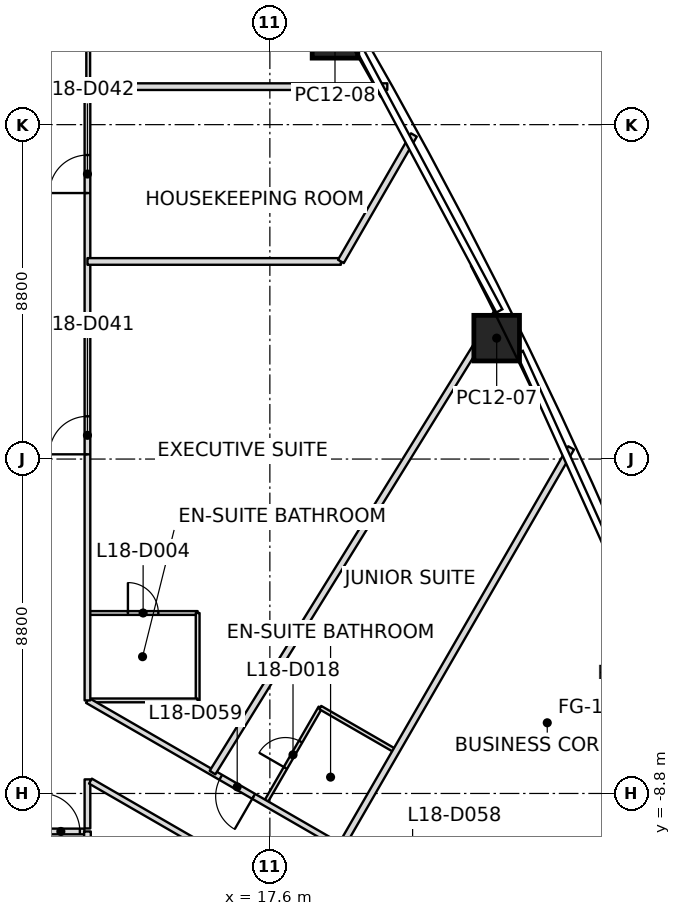
"""IFC4 building model, lengths in metres.
Left out: names, types, materials, properties, quantities, classifications, styles, units other than length and angle.
Written with IfcOpenShell. Run it as: python <this file> out.ifc"""

import sys

from ifc_helpers import new_model, si_unit, direction, frame, frame_2d, origin, origin_2d, place, context, subcontext, project, spatial, rectangle, extrude, element, fill, save


model = new_model("IFC4")
c1 = context("Model", 3, precision=1e-05, world=origin(), true_north=direction((0.0, 1.0)))
c2 = subcontext(c1, "Body", "Model", "MODEL_VIEW")
j1 = project(units=[si_unit("LENGTHUNIT", "METRE"), si_unit("PLANEANGLEUNIT", "RADIAN")], contexts=[c1])
p1 = place(None, origin())
s1 = spatial("IfcSite", under=j1, at=p1, CompositionType="ELEMENT")
p2 = place(p1, origin())
s2 = spatial("IfcBuilding", under=s1, at=p2, CompositionType="ELEMENT")
p3 = place(p2, frame((0.0, 0.0, 88.7)))
s3 = spatial("IfcBuildingStorey", under=s2, at=p3, CompositionType="ELEMENT", Elevation=88.7)
p4 = place(p3, frame((23.568, 3.182, 0.0), z_axis=(-0.015240683228, 0.002309194428, 0.99988118754), x_axis=(-0.441368451021, 0.897282817129, -0.008799802757)))
e1 = element("IfcColumn", 1, at=p4, inside=s3, PredefinedType="COLUMN", context=c2, shape_type="SweptSolid", body=[
    extrude(rectangle(XDim=1.2, YDim=1.2, at=origin_2d()), origin(), (0.0, 0.0, 1.0), 3.7),
])
p5 = place(p3, frame((19.314, 11.151, 0.0), z_axis=(-0.010754701703, -0.006136118149, 0.999923339284), x_axis=(-0.499971083262, 0.866042095943, -6.290806e-05)))
e2 = element("IfcColumn", 2, at=p5, inside=s3, PredefinedType="COLUMN", context=c2, shape_type="SweptSolid", body=[
    extrude(rectangle(XDim=1.2, YDim=1.2, at=origin_2d()), origin(), (0.0, 0.0, 1.0), 3.7),
])
p6 = place(p3, frame((12.8, -9.8, 0.0), z_axis=(0.0, 0.0, 1.0), x_axis=(0.0, -1.0, 0.0)))
e3 = element("IfcWall", 3, at=p6, inside=s3, PredefinedType="PARTITIONING", context=c2, shape_type="SweptSolid", body=[
    extrude(rectangle(XDim=6.271, YDim=0.175, at=frame_2d((3.135, 0.0))), origin(), (0.0, 0.0, 1.0), 3.15),
])
p7 = place(p3, frame((12.8, 5.2, 0.0), z_axis=(0.0, 0.0, 1.0), x_axis=(1.0, 0.0, 0.0)))
e4 = element("IfcWall", 4, at=p7, inside=s3, PredefinedType="PARTITIONING", context=c2, shape_type="SweptSolid", body=[
    extrude(rectangle(XDim=6.669, YDim=0.175, at=frame_2d((3.334, 0.0))), origin(), (0.0, 0.0, 1.0), 3.017),
])
p8 = place(p3, frame((19.469, 5.2, 0.0), z_axis=(0.0, 0.0, 1.0), x_axis=(0.50000659858, 0.866021594059, 0.0)))
e5 = element("IfcWall", 5, at=p8, inside=s3, PredefinedType="PARTITIONING", context=c2, shape_type="SweptSolid", body=[
    extrude(rectangle(XDim=3.843, YDim=0.175, at=frame_2d((1.921, 0.0))), origin(), (0.0, 0.0, 1.0), 2.934),
])
p9 = place(p3, frame((20.69, 9.8, 0.0), z_axis=(0.0, 0.0, 1.0), x_axis=(-1.0, 0.0, 0.0)))
e6 = element("IfcWall", 6, at=p9, inside=s3, PredefinedType="PARTITIONING", context=c2, shape_type="SweptSolid", body=[
    extrude(rectangle(XDim=7.81, YDim=0.175, at=frame_2d((3.905, 0.0))), origin(), (0.0, 0.0, 1.0), 2.934),
])
p10 = place(p3, frame((23.572, 3.843, 0.0), z_axis=(0.0, 0.0, 1.0), x_axis=(-0.526072077188, -0.850439985891, 0.0)))
e7 = element("IfcWall", 7, at=p10, inside=s3, PredefinedType="PARTITIONING", context=c2, shape_type="SweptSolid", body=[
    extrude(rectangle(XDim=14.221, YDim=0.175, at=frame_2d((7.11, 0.0))), origin(), (0.0, 0.0, 1.0), 2.947),
])
p11 = place(p3, frame((25.527, 0.293, 0.0), z_axis=(0.0, 0.0, 1.0), x_axis=(-0.499987549055, -0.866032592222, 0.0)))
e8 = element("IfcWall", 8, at=p11, inside=s3, PredefinedType="PARTITIONING", context=c2, shape_type="SweptSolid", body=[
    extrude(rectangle(XDim=12.117, YDim=0.175, at=frame_2d((6.059, 0.0))), origin(), (0.0, 0.0, 1.0), 2.934),
])
p12 = place(p3, frame((12.72, 9.8, 0.0), z_axis=(0.0, 0.0, 1.0), x_axis=(-1.0, 0.0, 0.0)))
e9 = element("IfcWall", 9, at=p12, inside=s3, PredefinedType="PARTITIONING", context=c2, shape_type="SweptSolid", body=[
    extrude(rectangle(XDim=3.92, YDim=0.15, at=frame_2d((1.96, 0.0))), origin(), (0.0, 0.0, 1.0), 3.15),
])
p13 = place(p12, frame((2.61, 0.0, 0.0)))
e10 = element("IfcOpeningElement", 10, at=p13, cuts=e9, PredefinedType="OPENING", context=c2, shape_type="SweptSolid", body=[
    extrude(rectangle(XDim=1.0, YDim=2.1, at=frame_2d((0.5, 1.05))), frame((0.0, 0.075, 0.0), z_axis=(0.0, -1.0, 0.0), x_axis=(1.0, 0.0, 0.0)), (0.0, 0.0, 1.0), 0.15),
])
p14 = place(p3, frame((9.0, -9.8, 0.0), z_axis=(0.0, 0.0, 1.0), x_axis=(1.0, 0.0, 0.0)))
e11 = element("IfcWall", 11, at=p14, inside=s3, PredefinedType="PARTITIONING", context=c2, shape_type="SweptSolid", body=[
    extrude(rectangle(XDim=3.72, YDim=0.15, at=frame_2d((1.86, 0.0))), origin(), (0.0, 0.0, 1.0), 3.017),
])
p15 = place(p14, frame((2.6, 0.0, 0.0)))
e12 = element("IfcOpeningElement", 12, at=p15, cuts=e11, PredefinedType="OPENING", context=c2, shape_type="SweptSolid", body=[
    extrude(rectangle(XDim=1.0, YDim=2.1, at=frame_2d((0.5, 1.05))), frame((0.0, 0.075, 0.0), z_axis=(0.0, -1.0, 0.0), x_axis=(1.0, 0.0, 0.0)), (0.0, 0.0, 1.0), 0.15),
])
p16 = place(p3, frame((12.8, -9.72, 0.0), z_axis=(0.0, 0.0, 1.0), x_axis=(0.0, 1.0, 0.0)))
e13 = element("IfcWall", 13, at=p16, inside=s3, PredefinedType="PARTITIONING", context=c2, shape_type="SweptSolid", body=[
    extrude(rectangle(XDim=1.291, YDim=0.15, at=frame_2d((0.646, 0.0))), origin(), (0.0, 0.0, 1.0), 2.797),
])
p17 = place(p3, frame((12.879, -8.475, 0.0), z_axis=(0.0, 0.0, 1.0), x_axis=(0.866025241123, -0.500000281738, 0.0)))
e14 = element("IfcWall", 14, at=p17, inside=s3, PredefinedType="PARTITIONING", context=c2, shape_type="SweptSolid", body=[
    extrude(rectangle(XDim=10.928, YDim=0.15, at=frame_2d((5.464, 0.0))), origin(), (0.0, 0.0, 1.0), 2.797),
])
p18 = place(p17, frame((4.918, 0.0, 0.0)))
e15 = element("IfcOpeningElement", 15, at=p18, cuts=e14, PredefinedType="OPENING", context=c2, shape_type="SweptSolid", body=[
    extrude(rectangle(XDim=1.0, YDim=2.1, at=frame_2d((0.5, 1.05))), frame((0.0, 0.075, 0.0), z_axis=(0.0, -1.0, 0.0), x_axis=(1.0, 0.0, 0.0)), (0.0, 0.0, 1.0), 0.15),
])
p19 = place(p3, frame((23.174, -12.34, 0.0), z_axis=(0.0, 0.0, 1.0), x_axis=(-0.866028448298, 0.49999472671, 0.0)))
e16 = element("IfcWall", 16, at=p19, inside=s3, PredefinedType="PARTITIONING", context=c2, shape_type="SweptSolid", body=[
    extrude(rectangle(XDim=11.979, YDim=0.15, at=frame_2d((5.99, 0.0))), origin(), (0.0, 0.0, 1.0), 2.947),
])
p20 = place(p19, frame((1.6, 0.0, 0.0)))
e17 = element("IfcOpeningElement", 17, at=p20, cuts=e16, PredefinedType="OPENING", context=c2, shape_type="SweptSolid", body=[
    extrude(rectangle(XDim=1.0, YDim=2.1, at=frame_2d((0.5, 1.05))), frame((0.0, 0.075, 0.0), z_axis=(0.0, -1.0, 0.0), x_axis=(1.0, 0.0, 0.0)), (0.0, 0.0, 1.0), 0.15),
])
p21 = place(p19, frame((6.929, 0.0, 0.0)))
e18 = element("IfcOpeningElement", 18, at=p21, cuts=e16, PredefinedType="OPENING", context=c2, shape_type="SweptSolid", body=[
    extrude(rectangle(XDim=1.0, YDim=2.1, at=frame_2d((0.5, 1.05))), frame((0.0, 0.075, 0.0), z_axis=(0.0, -1.0, 0.0), x_axis=(1.0, 0.0, 0.0)), (0.0, 0.0, 1.0), 0.15),
])
p22 = place(p3, frame((12.8, -6.351, 0.0), z_axis=(0.0, 0.0, 1.0), x_axis=(0.0, 1.0, 0.0)))
e19 = element("IfcWall", 19, at=p22, inside=s3, PredefinedType="PARTITIONING", context=c2, shape_type="SweptSolid", body=[
    extrude(rectangle(XDim=16.071, YDim=0.15, at=frame_2d((8.035, 0.0))), origin(), (0.0, 0.0, 1.0), 2.947),
])
p23 = place(p22, frame((6.476, 0.0, 0.0)))
e20 = element("IfcOpeningElement", 20, at=p23, cuts=e19, PredefinedType="OPENING", context=c2, shape_type="SweptSolid", body=[
    extrude(rectangle(XDim=1.0, YDim=2.1, at=frame_2d((0.5, 1.05))), frame((0.0, 0.075, 0.0), z_axis=(0.0, -1.0, 0.0), x_axis=(1.0, 0.0, 0.0)), (0.0, 0.0, 1.0), 0.15),
])
p24 = place(p22, frame((13.351, 0.0, 0.0)))
e21 = element("IfcOpeningElement", 21, at=p24, cuts=e19, PredefinedType="OPENING", context=c2, shape_type="SweptSolid", body=[
    extrude(rectangle(XDim=1.0, YDim=2.1, at=frame_2d((0.5, 1.05))), frame((0.0, 0.075, 0.0), z_axis=(0.0, -1.0, 0.0), x_axis=(1.0, 0.0, 0.0)), (0.0, 0.0, 1.0), 0.15),
])
p25 = place(p3, frame((12.82, 12.7, 0.0), z_axis=(0.0, 0.0, 1.0), x_axis=(0.0, -1.0, 0.0)))
e22 = element("IfcWall", 22, at=p25, inside=s3, PredefinedType="PARTITIONING", context=c2, shape_type="SweptSolid", body=[
    extrude(rectangle(XDim=2.87, YDim=0.1, at=frame_2d((1.435, 0.0))), origin(), (0.0, 0.0, 1.0), 3.15),
])
p26 = place(p3, frame((12.83, -4.051, 0.0), z_axis=(0.0, 0.0, 1.0), x_axis=(1.0, 0.0, 0.0)))
e23 = element("IfcWall", 23, at=p26, inside=s3, PredefinedType="PARTITIONING", context=c2, shape_type="SweptSolid", body=[
    extrude(rectangle(XDim=2.87, YDim=0.1, at=frame_2d((1.435, 0.0))), origin(), (0.0, 0.0, 1.0), 2.947),
])
p27 = place(p26, frame((1.035, 0.0, 0.0)))
e24 = element("IfcOpeningElement", 24, at=p27, cuts=e23, PredefinedType="OPENING", context=c2, shape_type="SweptSolid", body=[
    extrude(rectangle(XDim=0.8, YDim=2.1, at=frame_2d((0.4, 1.05))), frame((0.0, 0.05, 0.0), z_axis=(0.0, -1.0, 0.0), x_axis=(1.0, 0.0, 0.0)), (0.0, 0.0, 1.0), 0.1),
])
p28 = place(p3, frame((15.7, -4.051, 0.0), z_axis=(0.0, 0.0, 1.0), x_axis=(0.0, -1.0, 0.0)))
e25 = element("IfcWall", 25, at=p28, inside=s3, PredefinedType="PARTITIONING", context=c2, shape_type="SweptSolid", body=[
    extrude(rectangle(XDim=2.3, YDim=0.1, at=frame_2d((1.15, 0.0))), origin(), (0.0, 0.0, 1.0), 2.947),
])
p29 = place(p3, frame((15.7, -6.351, 0.0), z_axis=(0.0, 0.0, 1.0), x_axis=(-1.0, 0.0, 0.0)))
e26 = element("IfcWall", 26, at=p29, inside=s3, PredefinedType="PARTITIONING", context=c2, shape_type="SweptSolid", body=[
    extrude(rectangle(XDim=2.84, YDim=0.1, at=frame_2d((1.42, 0.0))), origin(), (0.0, 0.0, 1.0), 3.15),
])
p30 = place(p3, frame((17.491, -9.025, 0.0), z_axis=(0.0, 0.0, 1.0), x_axis=(0.499999802827, 0.866025517622, 0.0)))
e27 = element("IfcWall", 27, at=p30, inside=s3, PredefinedType="PARTITIONING", context=c2, shape_type="SweptSolid", body=[
    extrude(rectangle(XDim=2.87, YDim=0.1, at=frame_2d((1.435, 0.0))), origin(), (0.0, 0.0, 1.0), 3.15),
])
p31 = place(p30, frame((1.035, 0.0, 0.0)))
e28 = element("IfcOpeningElement", 28, at=p31, cuts=e27, PredefinedType="OPENING", context=c2, shape_type="SweptSolid", body=[
    extrude(rectangle(XDim=0.8, YDim=2.1, at=frame_2d((0.4, 1.05))), frame((0.0, 0.05, 0.0), z_axis=(0.0, -1.0, 0.0), x_axis=(1.0, 0.0, 0.0)), (0.0, 0.0, 1.0), 0.1),
])
p32 = place(p3, frame((18.927, -6.539, 0.0), z_axis=(0.0, 0.0, 1.0), x_axis=(0.866017224141, -0.500014167291, 0.0)))
e29 = element("IfcWall", 29, at=p32, inside=s3, PredefinedType="PARTITIONING", context=c2, shape_type="SweptSolid", body=[
    extrude(rectangle(XDim=2.27, YDim=0.1, at=frame_2d((1.135, 0.0))), origin(), (0.0, 0.0, 1.0), 3.15),
])
p33 = place(p23, origin())
e30 = element("IfcDoor", 30, at=p33, inside=s3, OperationType="SINGLE_SWING_LEFT", PredefinedType="DOOR", context=c2, shape_type="SweptSolid", body=[
    extrude(rectangle(XDim=1.0, YDim=2.1, at=frame_2d((0.5, 1.05))), frame((0.0, 0.025, 0.0), z_axis=(0.0, -1.0, 0.0), x_axis=(1.0, 0.0, 0.0)), (0.0, 0.0, 1.0), 0.05),
])
fill(e20, e30)
p34 = place(p27, origin())
e31 = element("IfcDoor", 31, at=p34, inside=s3, OperationType="SINGLE_SWING_RIGHT", PredefinedType="DOOR", context=c2, shape_type="SweptSolid", body=[
    extrude(rectangle(XDim=0.8, YDim=2.1, at=frame_2d((0.4, 1.05))), frame((0.0, 0.025, 0.0), z_axis=(0.0, -1.0, 0.0), x_axis=(1.0, 0.0, 0.0)), (0.0, 0.0, 1.0), 0.05),
])
fill(e24, e31)
p35 = place(p24, origin())
e32 = element("IfcDoor", 32, at=p35, inside=s3, OperationType="SINGLE_SWING_RIGHT", PredefinedType="DOOR", context=c2, shape_type="SweptSolid", body=[
    extrude(rectangle(XDim=1.0, YDim=2.1, at=frame_2d((0.5, 1.05))), frame((0.0, 0.025, 0.0), z_axis=(0.0, -1.0, 0.0), x_axis=(1.0, 0.0, 0.0)), (0.0, 0.0, 1.0), 0.05),
])
fill(e21, e32)
p36 = place(p15, origin())
e33 = element("IfcDoor", 33, at=p36, inside=s3, OperationType="SINGLE_SWING_LEFT", PredefinedType="DOOR", context=c2, shape_type="SweptSolid", body=[
    extrude(rectangle(XDim=1.0, YDim=2.1, at=frame_2d((0.5, 1.05))), frame((0.0, 0.025, 0.0), z_axis=(0.0, -1.0, 0.0), x_axis=(1.0, 0.0, 0.0)), (0.0, 0.0, 1.0), 0.05),
])
fill(e12, e33)
p37 = place(p21, origin())
e34 = element("IfcDoor", 34, at=p37, inside=s3, OperationType="SINGLE_SWING_LEFT", PredefinedType="DOOR", context=c2, shape_type="SweptSolid", body=[
    extrude(rectangle(XDim=1.0, YDim=2.1, at=frame_2d((0.5, 1.05))), frame((0.0, 0.025, 0.0), z_axis=(0.0, -1.0, 0.0), x_axis=(1.0, 0.0, 0.0)), (0.0, 0.0, 1.0), 0.05),
])
fill(e18, e34)
p38 = place(p31, origin())
e35 = element("IfcDoor", 35, at=p38, inside=s3, OperationType="SINGLE_SWING_RIGHT", PredefinedType="DOOR", context=c2, shape_type="SweptSolid", body=[
    extrude(rectangle(XDim=0.8, YDim=2.1, at=frame_2d((0.4, 1.05))), frame((0.0, 0.025, 0.0), z_axis=(0.0, -1.0, 0.0), x_axis=(1.0, 0.0, 0.0)), (0.0, 0.0, 1.0), 0.05),
])
fill(e28, e35)
save(model, sys.argv[1])
